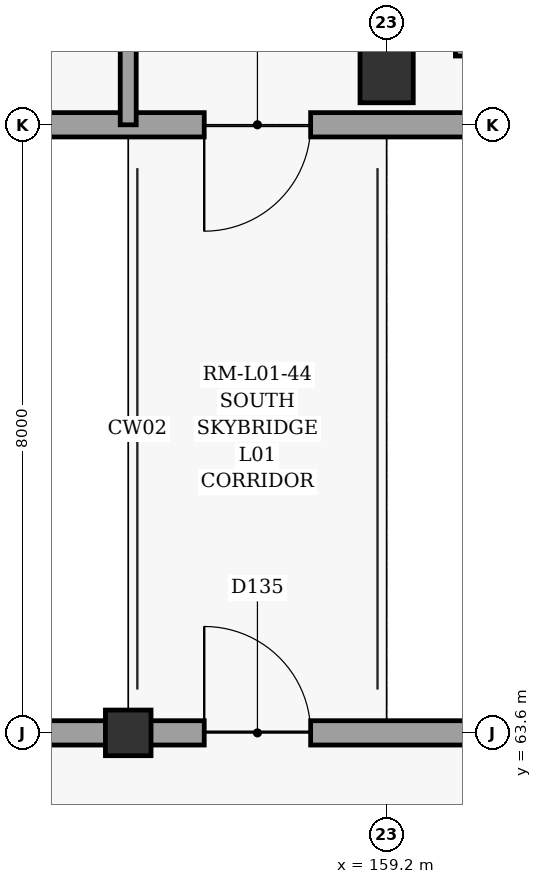
"""IFC4 building model, lengths in metres.
Left out: names, types, materials, properties, quantities, classifications, styles, units other than length and angle.
Written with IfcOpenShell. Run it as: python <this file> out.ifc"""

import sys

from ifc_helpers import new_model, si_unit, direction, frame, frame_2d, origin, origin_2d, place, context, subcontext, project, spatial, rectangle, extrude, element, fill, save


model = new_model("IFC4")
c1 = context("Model", 3, precision=1e-05, world=origin(), true_north=direction((0.0, 1.0)))
c2 = subcontext(c1, "Body", "Model", "MODEL_VIEW")
j1 = project(units=[si_unit("LENGTHUNIT", "METRE"), si_unit("PLANEANGLEUNIT", "RADIAN")], contexts=[c1])
p1 = place(None, origin())
s1 = spatial("IfcSite", under=j1, at=p1, CompositionType="ELEMENT")
p2 = place(p1, origin())
s2 = spatial("IfcBuilding", under=s1, at=p2, CompositionType="ELEMENT")
p3 = place(p2, frame((0.0, 0.0, 5.4)))
s3 = spatial("IfcBuildingStorey", under=s2, at=p3, CompositionType="ELEMENT", Elevation=5.4)
p4 = place(p3, frame((155.8, 63.6, 0.0), z_axis=(0.0, 0.0, 1.0), x_axis=(1.0, 0.0, 0.0)))
e1 = element("IfcColumn", 1, at=p4, inside=s3, PredefinedType="COLUMN", context=c2, shape_type="SweptSolid", body=[
    extrude(rectangle(XDim=0.6, YDim=0.6, at=origin_2d()), origin(), (0.0, 0.0, 1.0), 4.8),
])
p5 = place(p3, frame((159.2, 72.24, 0.0), z_axis=(0.0, 0.0, 1.0), x_axis=(1.0, 0.0, 0.0)))
e2 = element("IfcColumn", 2, at=p5, inside=s3, PredefinedType="COLUMN", context=c2, shape_type="SweptSolid", body=[
    extrude(rectangle(XDim=0.7, YDim=0.7, at=origin_2d()), origin(), (0.0, 0.0, 1.0), 4.8),
])
p6 = place(p3, frame((149.2, 63.6, 0.0), z_axis=(0.0, 0.0, 1.0), x_axis=(1.0, 0.0, 0.0)))
e3 = element("IfcWall", 3, at=p6, inside=s3, PredefinedType="SOLIDWALL", context=c2, shape_type="SweptSolid", body=[
    extrude(rectangle(XDim=22.8, YDim=0.32, at=frame_2d((11.4, 0.0))), origin(), (0.0, 0.0, 1.0), 3.67),
])
p7 = place(p6, frame((2.2, 0.0, 0.9)))
e4 = element("IfcOpeningElement", 4, at=p7, cuts=e3, PredefinedType="OPENING", context=c2, shape_type="SweptSolid", body=[
    extrude(rectangle(XDim=2.2, YDim=1.7, at=frame_2d((1.1, 0.85))), frame((0.0, 0.17, 0.0), z_axis=(0.0, -1.0, 0.0), x_axis=(1.0, 0.0, 0.0)), (0.0, 0.0, 1.0), 0.34),
])
p8 = place(p6, frame((7.6, 0.0, 0.0)))
e5 = element("IfcOpeningElement", 5, at=p8, cuts=e3, PredefinedType="OPENING", context=c2, shape_type="SweptSolid", body=[
    extrude(rectangle(XDim=1.4, YDim=2.25, at=frame_2d((0.7, 1.125))), frame((0.0, 0.17, 0.0), z_axis=(0.0, -1.0, 0.0), x_axis=(1.0, 0.0, 0.0)), (0.0, 0.0, 1.0), 0.34),
])
p9 = place(p3, frame((172.0, 71.6, 0.0), z_axis=(0.0, 0.0, 1.0), x_axis=(-1.0, 0.0, 0.0)))
e6 = element("IfcWall", 6, at=p9, inside=s3, PredefinedType="SOLIDWALL", context=c2, shape_type="SweptSolid", body=[
    extrude(rectangle(XDim=32.4, YDim=0.32, at=frame_2d((16.2, 0.0))), origin(), (0.0, 0.0, 1.0), 3.85),
])
p10 = place(p9, frame((7.96, 0.0, 0.8)))
e7 = element("IfcOpeningElement", 7, at=p10, cuts=e6, PredefinedType="OPENING", context=c2, shape_type="SweptSolid", body=[
    extrude(rectangle(XDim=1.6, YDim=1.65, at=frame_2d((0.8, 0.825))), frame((0.0, 0.17, 0.0), z_axis=(0.0, -1.0, 0.0), x_axis=(1.0, 0.0, 0.0)), (0.0, 0.0, 1.0), 0.34),
])
p11 = place(p9, frame((19.48, 0.0, 0.8)))
e8 = element("IfcOpeningElement", 8, at=p11, cuts=e6, PredefinedType="OPENING", context=c2, shape_type="SweptSolid", body=[
    extrude(rectangle(XDim=1.6, YDim=1.65, at=frame_2d((0.8, 0.825))), frame((0.0, 0.17, 0.0), z_axis=(0.0, -1.0, 0.0), x_axis=(1.0, 0.0, 0.0)), (0.0, 0.0, 1.0), 0.34),
])
p12 = place(p9, frame((25.24, 0.0, 0.8)))
e9 = element("IfcOpeningElement", 9, at=p12, cuts=e6, PredefinedType="OPENING", context=c2, shape_type="SweptSolid", body=[
    extrude(rectangle(XDim=1.6, YDim=1.65, at=frame_2d((0.8, 0.825))), frame((0.0, 0.17, 0.0), z_axis=(0.0, -1.0, 0.0), x_axis=(1.0, 0.0, 0.0)), (0.0, 0.0, 1.0), 0.34),
])
p13 = place(p9, frame((13.8, 0.0, 0.0)))
e10 = element("IfcOpeningElement", 10, at=p13, cuts=e6, PredefinedType="OPENING", context=c2, shape_type="SweptSolid", body=[
    extrude(rectangle(XDim=1.4, YDim=2.25, at=frame_2d((0.7, 1.125))), frame((0.0, 0.17, 0.0), z_axis=(0.0, -1.0, 0.0), x_axis=(1.0, 0.0, 0.0)), (0.0, 0.0, 1.0), 0.34),
])
p14 = place(p3, frame((160.105, 72.6, 0.0), z_axis=(0.0, 0.0, 1.0), x_axis=(1.0, 0.0, 0.0)))
e11 = element("IfcWall", 11, at=p14, inside=s3, PredefinedType="PARTITIONING", context=c2, shape_type="SweptSolid", body=[
    extrude(rectangle(XDim=4.143, YDim=0.19, at=frame_2d((2.072, 0.0))), origin(), (0.0, 0.0, 1.0), 3.9),
])
p15 = place(p3, frame((155.8, 71.6, 0.0), z_axis=(0.0, 0.0, 1.0), x_axis=(0.0, 1.0, 0.0)))
e12 = element("IfcWall", 12, at=p15, inside=s3, PredefinedType="PARTITIONING", context=c2, shape_type="SweptSolid", body=[
    extrude(rectangle(XDim=2.8, YDim=0.21, at=frame_2d((1.4, 0.0))), origin(), (0.0, 0.0, 1.0), 4.55),
])
p16 = place(p8, origin())
e13 = element("IfcDoor", 13, at=p16, inside=s3, OperationType="SINGLE_SWING_LEFT", PredefinedType="DOOR", context=c2, shape_type="SweptSolid", body=[
    extrude(rectangle(XDim=1.4, YDim=2.25, at=frame_2d((0.7, 1.125))), frame((0.0, 0.025, 0.0), z_axis=(0.0, -1.0, 0.0), x_axis=(1.0, 0.0, 0.0)), (0.0, 0.0, 1.0), 0.05),
])
fill(e5, e13)
p17 = place(p13, origin())
e14 = element("IfcDoor", 14, at=p17, inside=s3, OperationType="SINGLE_SWING_RIGHT", PredefinedType="DOOR", context=c2, shape_type="SweptSolid", body=[
    extrude(rectangle(XDim=1.4, YDim=2.25, at=frame_2d((0.7, 1.125))), frame((0.0, 0.025, 0.0), z_axis=(0.0, -1.0, 0.0), x_axis=(1.0, 0.0, 0.0)), (0.0, 0.0, 1.0), 0.05),
])
fill(e10, e14)
save(model, sys.argv[1])
